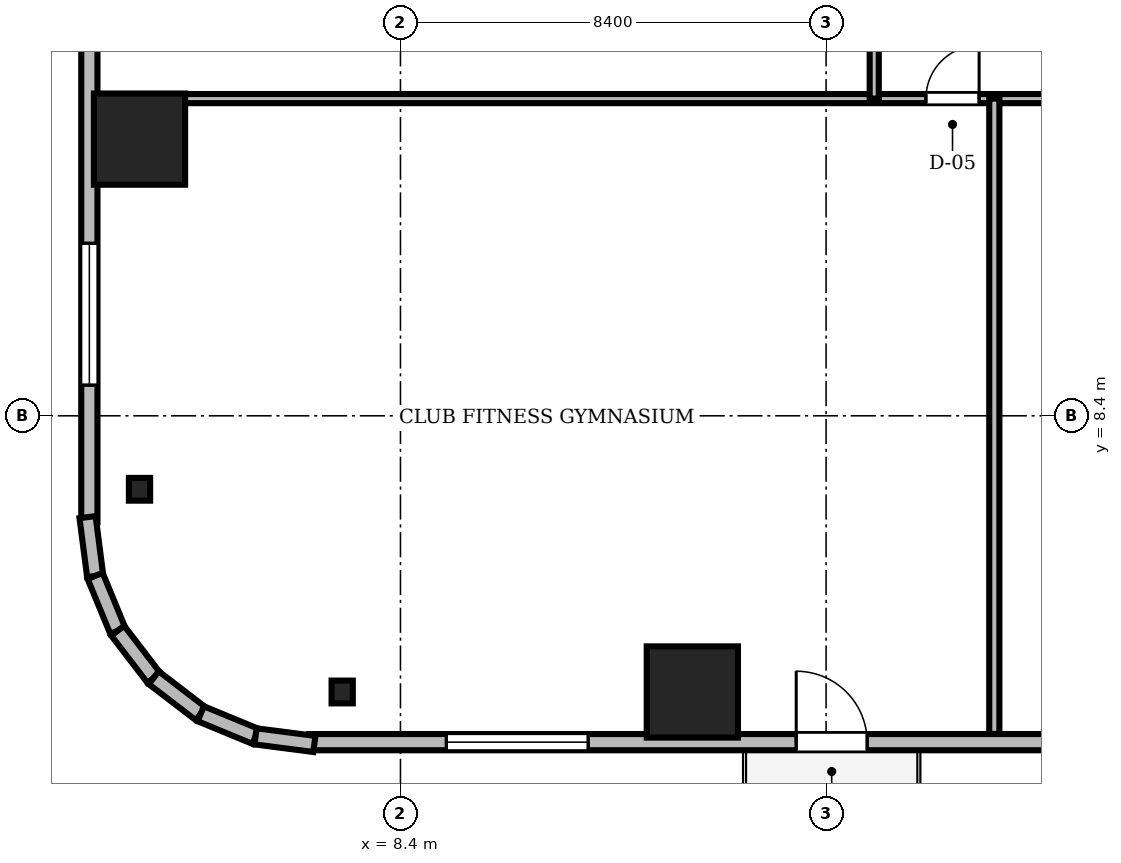
"""IFC4 building model, lengths in metres.
Left out: names, types, materials, properties, quantities, classifications, styles, units other than length and angle.
Written with IfcOpenShell. Run it as: python <this file> out.ifc"""

import sys

from ifc_helpers import new_model, si_unit, direction, frame, frame_2d, origin, origin_2d, place, context, subcontext, project, spatial, rectangle, i_section, extrude, source, transform, mapped, element, fill, save


model = new_model("IFC4")
c1 = context("Model", 3, precision=1e-05, world=origin(), true_north=direction((0.0, 1.0)))
c2 = subcontext(c1, "Body", "Model", "MODEL_VIEW")
j1 = project(units=[si_unit("LENGTHUNIT", "METRE"), si_unit("PLANEANGLEUNIT", "RADIAN")], contexts=[c1])
p1 = place(None, origin())
s1 = spatial("IfcSite", under=j1, at=p1, CompositionType="ELEMENT")
p2 = place(p1, origin())
s2 = spatial("IfcBuilding", under=s1, at=p2, CompositionType="ELEMENT")
p3 = place(p2, frame((0.0, 0.0, 27.6)))
s3 = spatial("IfcBuildingStorey", under=s2, at=p3, CompositionType="ELEMENT", Elevation=27.6)
m1 = source(origin(), c2, "Body", "SweptSolid", [
    extrude(rectangle(XDim=1.8, YDim=1.8, at=origin_2d()), origin(), (0.0, 0.0, 1.0), 3.41),
])
for number, where, z_axis, x_axis in (
    (1, (14.16, 2.95, 0.0), (0.0, 0.0, 1.0), (1.0, 0.0, 0.0)),
    (2, (3.25, 13.86, 0.0), (0.0, 0.0, 1.0), (1.0, 0.0, 0.0)),
):
    element("IfcColumn", number, at=place(p3, frame(where, z_axis=z_axis, x_axis=x_axis)), inside=s3, PredefinedType="COLUMN", context=c2, shape_type="MappedRepresentation", body=[
        mapped(m1, transform((0.0, 0.0, 0.0), scale=1.0)),
    ])
m2 = source(origin(), c2, "Body", "SweptSolid", [
    extrude(i_section(OverallWidth=0.419, OverallDepth=0.449, WebThickness=0.031, FlangeThickness=0.048, FilletRadius=0.015, at=origin_2d()), origin(), (0.0, 0.0, 1.0), 3.41),
])
for number, where, z_axis, x_axis in (
    (3, (7.25, 2.95, 0.0), (0.0, 0.0, 1.0), (1.0, 0.0, 0.0)),
    (4, (3.25, 6.95, 0.0), (0.0, 0.0, 1.0), (1.0, 0.0, 0.0)),
):
    element("IfcColumn", number, at=place(p3, frame(where, z_axis=z_axis, x_axis=x_axis)), inside=s3, PredefinedType="COLUMN", context=c2, shape_type="MappedRepresentation", body=[
        mapped(m2, transform((0.0, 0.0, 0.0), scale=1.0)),
    ])
m3 = source(origin(), c2, "Body", "SweptSolid", [
    extrude(rectangle(XDim=15.6, YDim=0.32, at=frame_2d((7.8, 0.0))), origin(), (0.0, 0.0, 1.0), 3.41),
])
p4 = place(p3, frame((6.6, 1.96, 0.0), z_axis=(0.0, 0.0, 1.0), x_axis=(1.0, 0.0, 0.0)))
e5 = element("IfcWall", 5, at=p4, inside=s3, PredefinedType="SOLIDWALL", context=c2, shape_type="MappedRepresentation", body=[
    mapped(m3, transform((0.0, 0.0, 0.0), scale=1.0)),
])
m4 = source(origin(), c2, "Body", "SweptSolid", [
    extrude(rectangle(XDim=1.4, YDim=2.3, at=frame_2d((0.7, 1.15))), frame((0.0, 0.17, 0.0), z_axis=(0.0, -1.0, 0.0), x_axis=(1.0, 0.0, 0.0)), (0.0, 0.0, 1.0), 0.34),
])
p5 = place(p4, frame((9.61, 0.0, 0.0)))
e6 = element("IfcOpeningElement", 6, at=p5, cuts=e5, PredefinedType="OPENING", context=c2, shape_type="MappedRepresentation", body=[
    mapped(m4, transform((0.0, 0.0, 0.0), scale=1.0)),
])
m5 = source(origin(), c2, "Body", "SweptSolid", [
    extrude(rectangle(XDim=2.8, YDim=2.4, at=frame_2d((1.4, 1.2))), frame((0.0, 0.17, 0.0), z_axis=(0.0, -1.0, 0.0), x_axis=(1.0, 0.0, 0.0)), (0.0, 0.0, 1.0), 0.34),
])
p6 = place(p4, frame((2.705, 0.0, 0.72)))
e7 = element("IfcOpeningElement", 7, at=p6, cuts=e5, PredefinedType="OPENING", context=c2, shape_type="MappedRepresentation", body=[
    mapped(m5, transform((0.0, 0.0, 0.0), scale=1.0)),
])
p7 = place(p3, frame((2.26, 21.9, 0.0), z_axis=(0.0, 0.0, 1.0), x_axis=(0.0, -1.0, 0.0)))
e8 = element("IfcWall", 8, at=p7, inside=s3, PredefinedType="SOLIDWALL", context=c2, shape_type="MappedRepresentation", body=[
    mapped(m3, transform((0.0, 0.0, 0.0), scale=1.0)),
])
p8 = place(p7, frame((10.095, 0.0, 0.72)))
e9 = element("IfcOpeningElement", 9, at=p8, cuts=e8, PredefinedType="OPENING", context=c2, shape_type="MappedRepresentation", body=[
    mapped(m5, transform((0.0, 0.0, 0.0), scale=1.0)),
])
m6 = source(origin(), c2, "Body", "SweptSolid", [
    extrude(rectangle(XDim=1.171, YDim=0.32, at=frame_2d((0.585, 0.0))), origin(), (0.0, 0.0, 1.0), 3.41),
])
p9 = place(p3, frame((2.224, 6.401, 0.0), z_axis=(0.0, 0.0, 1.0), x_axis=(0.128269133229, -0.991739395941, 0.0)))
e10 = element("IfcWall", 10, at=p9, inside=s3, PredefinedType="SOLIDWALL", context=c2, shape_type="MappedRepresentation", body=[
    mapped(m6, transform((0.0, 0.0, 0.0), scale=1.0)),
])
m7 = source(origin(), c2, "Body", "SweptSolid", [
    extrude(rectangle(XDim=1.169, YDim=0.32, at=frame_2d((0.584, 0.0))), origin(), (0.0, 0.0, 1.0), 3.41),
])
for number, where, z_axis, x_axis in (
    (11, (2.375, 5.24, 0.0), (0.0, 0.0, 1.0), (0.381, -0.925, 0.0)),
    (12, (2.82, 4.159, 0.0), (0.0, 0.0, 1.0), (0.608, -0.794, 0.0)),
):
    element("IfcWall", number, at=place(p3, frame(where, z_axis=z_axis, x_axis=x_axis)), inside=s3, PredefinedType="SOLIDWALL", context=c2, shape_type="MappedRepresentation", body=[
        mapped(m7, transform((0.0, 0.0, 0.0), scale=1.0)),
    ])
m8 = source(origin(), c2, "Body", "SweptSolid", [
    extrude(rectangle(XDim=1.169, YDim=0.32, at=frame_2d((0.584, 0.0))), origin(), (0.0, 0.0, 1.0), 3.41),
])
p10 = place(p3, frame((3.531, 3.231, 0.0), z_axis=(0.0, 0.0, 1.0), x_axis=(0.793663520347, -0.608356981114, 0.0)))
e13 = element("IfcWall", 13, at=p10, inside=s3, PredefinedType="SOLIDWALL", context=c2, shape_type="MappedRepresentation", body=[
    mapped(m8, transform((0.0, 0.0, 0.0), scale=1.0)),
])
m9 = source(origin(), c2, "Body", "SweptSolid", [
    extrude(rectangle(XDim=1.169, YDim=0.32, at=frame_2d((0.585, 0.0))), origin(), (0.0, 0.0, 1.0), 3.41),
])
p11 = place(p3, frame((4.459, 2.52, 0.0), z_axis=(0.0, 0.0, 1.0), x_axis=(0.924479075121, -0.381232789334, 0.0)))
e14 = element("IfcWall", 14, at=p11, inside=s3, PredefinedType="SOLIDWALL", context=c2, shape_type="MappedRepresentation", body=[
    mapped(m9, transform((0.0, 0.0, 0.0), scale=1.0)),
])
m10 = source(origin(), c2, "Body", "SweptSolid", [
    extrude(rectangle(XDim=1.17, YDim=0.32, at=frame_2d((0.585, 0.0))), origin(), (0.0, 0.0, 1.0), 3.41),
])
p12 = place(p3, frame((5.54, 2.074, 0.0), z_axis=(0.0, 0.0, 1.0), x_axis=(0.991762485493, -0.128090485085, 0.0)))
e15 = element("IfcWall", 15, at=p12, inside=s3, PredefinedType="SOLIDWALL", context=c2, shape_type="MappedRepresentation", body=[
    mapped(m10, transform((0.0, 0.0, 0.0), scale=1.0)),
])
m11 = source(origin(), c2, "Body", "SweptSolid", [
    extrude(rectangle(XDim=46.156, YDim=0.18, at=frame_2d((23.078, 0.0))), origin(), (0.0, 0.0, 1.0), 2.652),
])
p13 = place(p3, frame((2.422, 14.66, 0.0), z_axis=(0.0, 0.0, 1.0), x_axis=(1.0, 0.0, 0.0)))
e16 = element("IfcWall", 16, at=p13, inside=s3, PredefinedType="PARTITIONING", context=c2, shape_type="MappedRepresentation", body=[
    mapped(m11, transform((0.0, 0.0, 0.0), scale=1.0)),
])
m12 = source(origin(), c2, "Body", "SweptSolid", [
    extrude(rectangle(XDim=1.05, YDim=2.2, at=frame_2d((0.525, 1.1))), frame((0.0, 0.1, 0.0), z_axis=(0.0, -1.0, 0.0), x_axis=(1.0, 0.0, 0.0)), (0.0, 0.0, 1.0), 0.2),
])
p14 = place(p13, frame((16.348, 0.0, 0.0)))
e17 = element("IfcOpeningElement", 17, at=p14, cuts=e16, PredefinedType="OPENING", context=c2, shape_type="MappedRepresentation", body=[
    mapped(m12, transform((0.0, 0.0, 0.0), scale=1.0)),
])
p15 = place(p13, frame((20.38, 0.0, 0.0)))
e18 = element("IfcOpeningElement", 18, at=p15, cuts=e16, PredefinedType="OPENING", context=c2, shape_type="MappedRepresentation", body=[
    mapped(m12, transform((0.0, 0.0, 0.0), scale=1.0)),
])
p16 = place(p13, frame((26.783, 0.0, 0.0)))
e19 = element("IfcOpeningElement", 19, at=p16, cuts=e16, PredefinedType="OPENING", context=c2, shape_type="MappedRepresentation", body=[
    mapped(m12, transform((0.0, 0.0, 0.0), scale=1.0)),
])
p17 = place(p13, frame((33.186, 0.0, 0.0)))
e20 = element("IfcOpeningElement", 20, at=p17, cuts=e16, PredefinedType="OPENING", context=c2, shape_type="MappedRepresentation", body=[
    mapped(m12, transform((0.0, 0.0, 0.0), scale=1.0)),
])
p18 = place(p13, frame((40.998, 0.0, 0.0)))
e21 = element("IfcOpeningElement", 21, at=p18, cuts=e16, PredefinedType="OPENING", context=c2, shape_type="MappedRepresentation", body=[
    mapped(m12, transform((0.0, 0.0, 0.0), scale=1.0)),
])
m13 = source(origin(), c2, "Body", "SweptSolid", [
    extrude(rectangle(XDim=13.89, YDim=0.18, at=frame_2d((6.945, 0.0))), origin(), (0.0, 0.0, 1.0), 2.802),
])
p19 = place(p3, frame((17.75, 14.66, 0.0), z_axis=(0.0, 0.0, 1.0), x_axis=(0.0, 1.0, 0.0)))
e22 = element("IfcWall", 22, at=p19, inside=s3, PredefinedType="PARTITIONING", context=c2, shape_type="MappedRepresentation", body=[
    mapped(m13, transform((0.0, 0.0, 0.0), scale=1.0)),
])
p20 = place(p19, frame((1.77, 0.0, 0.0)))
e23 = element("IfcOpeningElement", 23, at=p20, cuts=e22, PredefinedType="OPENING", context=c2, shape_type="MappedRepresentation", body=[
    mapped(m12, transform((0.0, 0.0, 0.0), scale=1.0)),
])
m14 = source(origin(), c2, "Body", "SweptSolid", [
    extrude(rectangle(XDim=0.95, YDim=2.15, at=frame_2d((0.475, 1.075))), frame((0.0, 0.1, 0.0), z_axis=(0.0, -1.0, 0.0), x_axis=(1.0, 0.0, 0.0)), (0.0, 0.0, 1.0), 0.2),
])
p21 = place(p19, frame((7.575, 0.0, 0.0)))
e24 = element("IfcOpeningElement", 24, at=p21, cuts=e22, PredefinedType="OPENING", context=c2, shape_type="MappedRepresentation", body=[
    mapped(m14, transform((0.0, 0.0, 0.0), scale=1.0)),
])
p22 = place(p19, frame((10.93, 0.0, 0.0)))
e25 = element("IfcOpeningElement", 25, at=p22, cuts=e22, PredefinedType="OPENING", context=c2, shape_type="MappedRepresentation", body=[
    mapped(m12, transform((0.0, 0.0, 0.0), scale=1.0)),
])
m15 = source(origin(), c2, "Body", "SweptSolid", [
    extrude(rectangle(XDim=12.538, YDim=0.2, at=frame_2d((6.269, 0.0))), origin(), (0.0, 0.0, 1.0), 2.652),
])
p23 = place(p3, frame((20.12, 2.122, 0.0), z_axis=(0.0, 0.0, 1.0), x_axis=(0.0, 1.0, 0.0)))
e26 = element("IfcWall", 26, at=p23, inside=s3, PredefinedType="PARTITIONING", context=c2, shape_type="MappedRepresentation", body=[
    mapped(m15, transform((0.0, 0.0, 0.0), scale=1.0)),
])
m16 = source(origin(), c2, "Body", "SweptSolid", [
    extrude(rectangle(XDim=1.4, YDim=2.3, at=frame_2d((0.7, 1.15))), frame((0.0, 0.025, 0.0), z_axis=(0.0, -1.0, 0.0), x_axis=(1.0, 0.0, 0.0)), (0.0, 0.0, 1.0), 0.05),
])
p24 = place(p5, frame((1.4, 0.0, 0.0), z_axis=(0.0, 0.0, 1.0), x_axis=(-1.0, 0.0, 0.0)))
e27 = element("IfcDoor", 27, at=p24, inside=s3, OperationType="DOUBLE_DOOR_SLIDING", PredefinedType="DOOR", context=c2, shape_type="MappedRepresentation", body=[
    mapped(m16, transform((0.0, 0.0, 0.0), scale=1.0)),
])
fill(e6, e27)
m17 = source(origin(), c2, "Body", "SweptSolid", [
    extrude(rectangle(XDim=2.8, YDim=2.4, at=frame_2d((1.4, 1.2))), frame((0.0, 0.03, 0.0), z_axis=(0.0, -1.0, 0.0), x_axis=(1.0, 0.0, 0.0)), (0.0, 0.0, 1.0), 0.06),
])
p25 = place(p6, origin())
e28 = element("IfcWindow", 28, at=p25, inside=s3, PartitioningType="SINGLE_PANEL", PredefinedType="WINDOW", context=c2, shape_type="MappedRepresentation", body=[
    mapped(m17, transform((0.0, 0.0, 0.0), scale=1.0)),
])
fill(e7, e28)
p26 = place(p8, origin())
e29 = element("IfcWindow", 29, at=p26, inside=s3, PartitioningType="SINGLE_PANEL", PredefinedType="WINDOW", context=c2, shape_type="MappedRepresentation", body=[
    mapped(m17, transform((0.0, 0.0, 0.0), scale=1.0)),
])
fill(e9, e29)
m18 = source(origin(), c2, "Body", "SweptSolid", [
    extrude(rectangle(XDim=1.05, YDim=2.2, at=frame_2d((0.525, 1.1))), frame((0.0, 0.025, 0.0), z_axis=(0.0, -1.0, 0.0), x_axis=(1.0, 0.0, 0.0)), (0.0, 0.0, 1.0), 0.05),
])
p27 = place(p14, origin())
e30 = element("IfcDoor", 30, at=p27, inside=s3, OperationType="SINGLE_SWING_RIGHT", PredefinedType="DOOR", context=c2, shape_type="MappedRepresentation", body=[
    mapped(m18, transform((0.0, 0.0, 0.0), scale=1.0)),
])
fill(e17, e30)
save(model, sys.argv[1])
